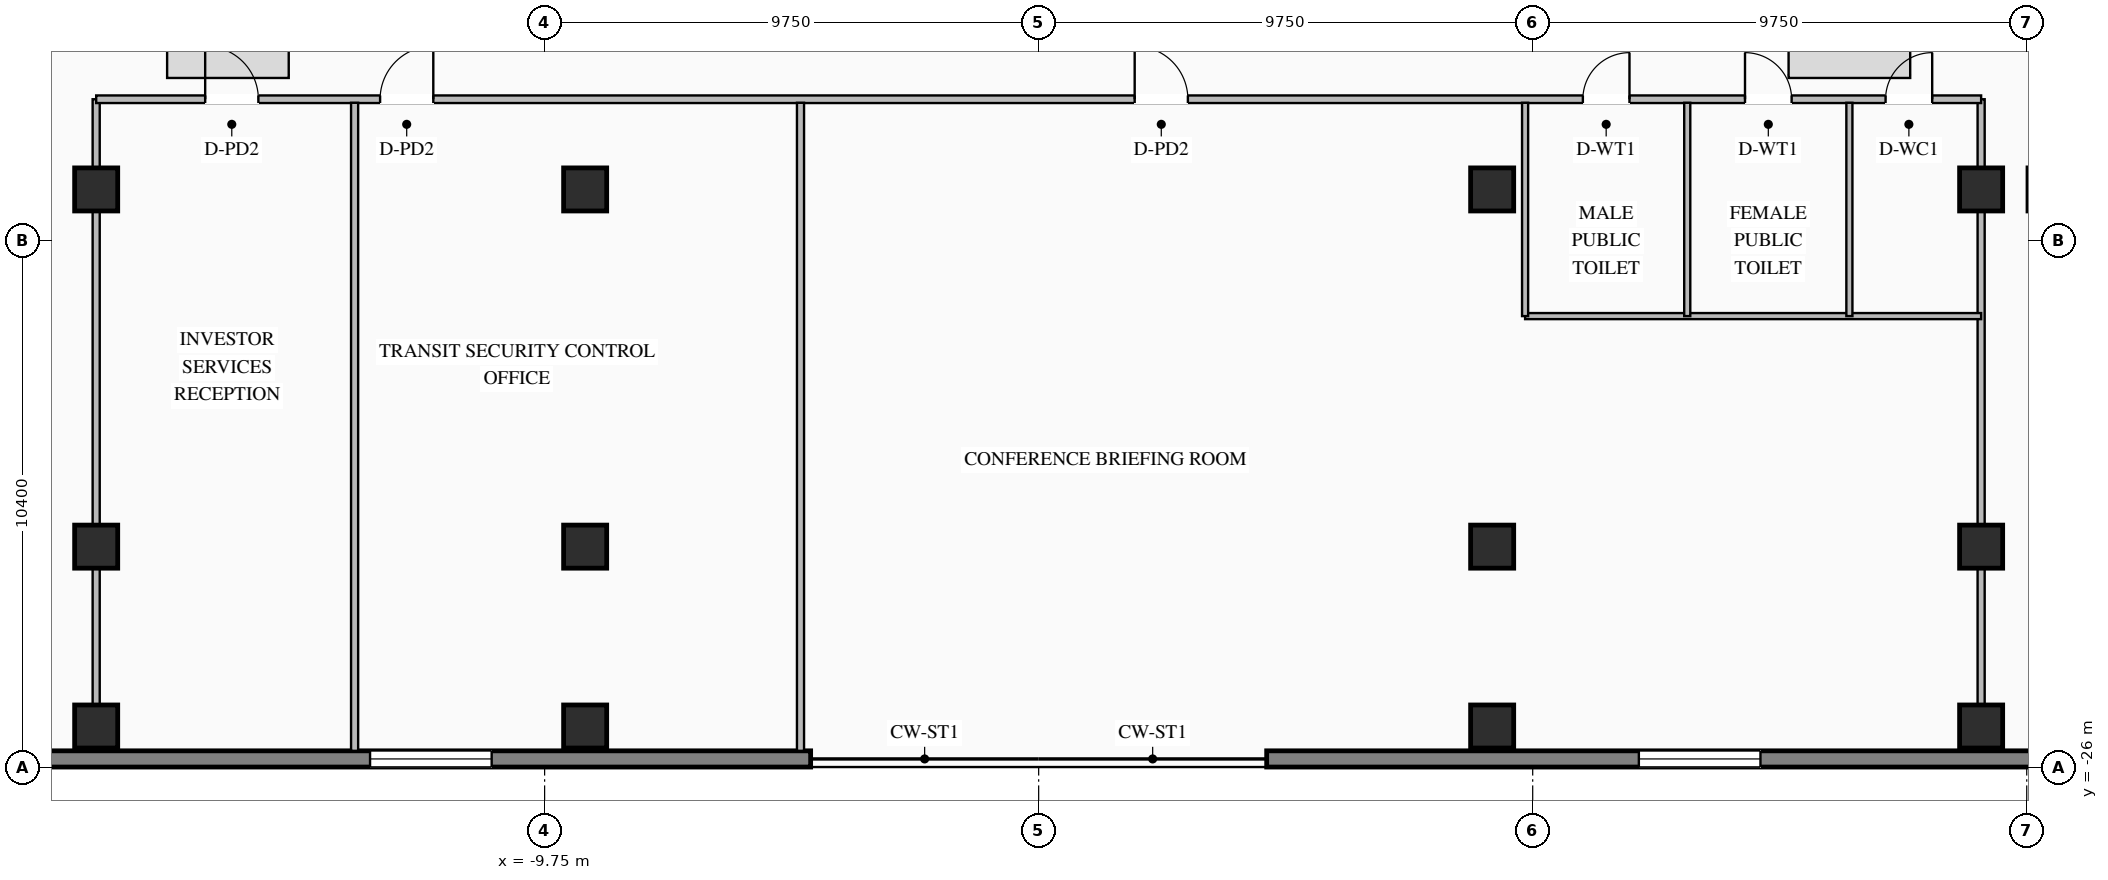
"""IFC4 building model, lengths in metres.
Left out: names, types, materials, properties, quantities, classifications, styles, units other than length and angle.
Written with IfcOpenShell. Run it as: python <this file> out.ifc"""

import sys

from ifc_helpers import new_model, si_unit, direction, frame, frame_2d, origin, origin_2d, place, context, subcontext, project, spatial, rectangle, i_section, extrude, element, fill, save


model = new_model("IFC4")
c1 = context("Model", 3, precision=1e-05, world=origin(), true_north=direction((0.0, 1.0)))
c2 = subcontext(c1, "Body", "Model", "MODEL_VIEW")
j1 = project(units=[si_unit("LENGTHUNIT", "METRE"), si_unit("PLANEANGLEUNIT", "RADIAN")], contexts=[c1])
p1 = place(None, origin())
s1 = spatial("IfcSite", under=j1, at=p1, CompositionType="ELEMENT")
p2 = place(p1, origin())
s2 = spatial("IfcBuilding", under=s1, at=p2, CompositionType="ELEMENT")
p3 = place(p2, frame((0.0, 0.0, 5.1)))
s3 = spatial("IfcBuildingStorey", under=s2, at=p3, CompositionType="ELEMENT", Elevation=5.1)
for number, where, z_axis, x_axis in (
    (1, (-18.6, -14.6, 0.0), (0.0, 0.0, 1.0), (1.0, 0.0, 0.0)),
    (2, (-8.95, -14.6, 0.0), (0.0, 0.0, 1.0), (1.0, 0.0, 0.0)),
    (3, (8.95, -14.6, 0.0), (0.0, 0.0, 1.0), (1.0, 0.0, 0.0)),
    (4, (18.6, -14.6, 0.0), (0.0, 0.0, 1.0), (1.0, 0.0, 0.0)),
    (5, (19.95, -14.6, 0.0), (0.0, 0.0, 1.0), (1.0, 0.0, 0.0)),
    (6, (-18.6, -21.65, 0.0), (0.0, 0.0, 1.0), (1.0, 0.0, 0.0)),
    (7, (-8.95, -21.65, 0.0), (0.0, 0.0, 1.0), (1.0, 0.0, 0.0)),
    (8, (8.95, -21.65, 0.0), (0.0, 0.0, 1.0), (1.0, 0.0, 0.0)),
    (9, (18.6, -21.65, 0.0), (0.0, 0.0, 1.0), (1.0, 0.0, 0.0)),
    (10, (-18.6, -25.2, 0.0), (0.0, 0.0, 1.0), (1.0, 0.0, 0.0)),
    (11, (-8.95, -25.2, 0.0), (0.0, 0.0, 1.0), (1.0, 0.0, 0.0)),
    (12, (8.95, -25.2, 0.0), (0.0, 0.0, 1.0), (1.0, 0.0, 0.0)),
    (13, (18.6, -25.2, 0.0), (0.0, 0.0, 1.0), (1.0, 0.0, 0.0)),
):
    element("IfcColumn", number, at=place(p3, frame(where, z_axis=z_axis, x_axis=x_axis)), inside=s3, PredefinedType="COLUMN", context=c2, shape_type="SweptSolid", body=[
        extrude(i_section(OverallWidth=0.85, OverallDepth=0.85, WebThickness=0.032, FlangeThickness=0.048, at=origin_2d()), origin(), (0.0, 0.0, 1.0), 4.5),
    ])
p4 = place(p3, frame((38.68, -25.84, 0.0), z_axis=(0.0, 0.0, 1.0), x_axis=(-1.0, 0.0, 0.0)))
e14 = element("IfcWall", 14, at=p4, inside=s3, PredefinedType="STANDARD", context=c2, shape_type="SweptSolid", body=[
    extrude(rectangle(XDim=34.18, YDim=0.32, at=frame_2d((17.09, 0.0))), origin(), (0.0, 0.0, 1.0), 4.23),
])
p5 = place(p4, frame((6.795, 0.0, 0.8)))
e15 = element("IfcOpeningElement", 15, at=p5, cuts=e14, PredefinedType="OPENING", context=c2, shape_type="SweptSolid", body=[
    extrude(rectangle(XDim=2.4, YDim=2.35, at=frame_2d((1.2, 1.175))), frame((0.0, 0.17, 0.0), z_axis=(0.0, -1.0, 0.0), x_axis=(1.0, 0.0, 0.0)), (0.0, 0.0, 1.0), 0.34),
])
p6 = place(p4, frame((16.44, 0.0, 0.8)))
e16 = element("IfcOpeningElement", 16, at=p6, cuts=e14, PredefinedType="OPENING", context=c2, shape_type="SweptSolid", body=[
    extrude(rectangle(XDim=2.4, YDim=2.35, at=frame_2d((1.2, 1.175))), frame((0.0, 0.17, 0.0), z_axis=(0.0, -1.0, 0.0), x_axis=(1.0, 0.0, 0.0)), (0.0, 0.0, 1.0), 0.34),
])
p7 = place(p4, frame((24.435, 0.0, 0.8)))
e17 = element("IfcOpeningElement", 17, at=p7, cuts=e14, PredefinedType="OPENING", context=c2, shape_type="SweptSolid", body=[
    extrude(rectangle(XDim=2.4, YDim=2.35, at=frame_2d((1.2, 1.175))), frame((0.0, 0.17, 0.0), z_axis=(0.0, -1.0, 0.0), x_axis=(1.0, 0.0, 0.0)), (0.0, 0.0, 1.0), 0.34),
])
p8 = place(p3, frame((-4.5, -25.84, 0.0), z_axis=(0.0, 0.0, 1.0), x_axis=(-1.0, 0.0, 0.0)))
e18 = element("IfcWall", 18, at=p8, inside=s3, PredefinedType="STANDARD", context=c2, shape_type="SweptSolid", body=[
    extrude(rectangle(XDim=34.18, YDim=0.32, at=frame_2d((17.09, 0.0))), origin(), (0.0, 0.0, 1.0), 4.23),
])
p9 = place(p8, frame((6.295, 0.0, 0.8)))
e19 = element("IfcOpeningElement", 19, at=p9, cuts=e18, PredefinedType="OPENING", context=c2, shape_type="SweptSolid", body=[
    extrude(rectangle(XDim=2.4, YDim=2.35, at=frame_2d((1.2, 1.175))), frame((0.0, 0.17, 0.0), z_axis=(0.0, -1.0, 0.0), x_axis=(1.0, 0.0, 0.0)), (0.0, 0.0, 1.0), 0.34),
])
p10 = place(p8, frame((15.34, 0.0, 0.8)))
e20 = element("IfcOpeningElement", 20, at=p10, cuts=e18, PredefinedType="OPENING", context=c2, shape_type="SweptSolid", body=[
    extrude(rectangle(XDim=2.4, YDim=2.35, at=frame_2d((1.2, 1.175))), frame((0.0, 0.17, 0.0), z_axis=(0.0, -1.0, 0.0), x_axis=(1.0, 0.0, 0.0)), (0.0, 0.0, 1.0), 0.34),
])
p11 = place(p8, frame((24.985, 0.0, 0.8)))
e21 = element("IfcOpeningElement", 21, at=p11, cuts=e18, PredefinedType="OPENING", context=c2, shape_type="SweptSolid", body=[
    extrude(rectangle(XDim=2.4, YDim=2.35, at=frame_2d((1.2, 1.175))), frame((0.0, 0.17, 0.0), z_axis=(0.0, -1.0, 0.0), x_axis=(1.0, 0.0, 0.0)), (0.0, 0.0, 1.0), 0.34),
])
for number, where, z_axis, x_axis in (
    (22, (-18.6, -25.68, 0.0), (0.0, 0.0, 1.0), (0.0, 1.0, 0.0)),
    (23, (18.6, -25.68, 0.0), (0.0, 0.0, 1.0), (0.0, 1.0, 0.0)),
):
    element("IfcWall", number, at=place(p3, frame(where, z_axis=z_axis, x_axis=x_axis)), inside=s3, PredefinedType="STANDARD", context=c2, shape_type="SweptSolid", body=[
        extrude(rectangle(XDim=12.86, YDim=0.14, at=frame_2d((6.43, 0.0))), origin(), (0.0, 0.0, 1.0), 3.525),
    ])
p12 = place(p3, frame((-18.6, -12.82, 0.0), z_axis=(0.0, 0.0, 1.0), x_axis=(1.0, 0.0, 0.0)))
e24 = element("IfcWall", 24, at=p12, inside=s3, PredefinedType="STANDARD", context=c2, shape_type="SweptSolid", body=[
    extrude(rectangle(XDim=37.2, YDim=0.15, at=frame_2d((18.6, 0.0))), origin(), (0.0, 0.0, 1.0), 4.23),
])
p13 = place(p12, frame((29.34, 0.0, 0.0)))
e25 = element("IfcOpeningElement", 25, at=p13, cuts=e24, PredefinedType="OPENING", context=c2, shape_type="SweptSolid", body=[
    extrude(rectangle(XDim=0.92, YDim=2.08, at=frame_2d((0.46, 1.04))), frame((0.0, 0.085, 0.0), z_axis=(0.0, -1.0, 0.0), x_axis=(1.0, 0.0, 0.0)), (0.0, 0.0, 1.0), 0.17),
])
p14 = place(p12, frame((32.54, 0.0, 0.0)))
e26 = element("IfcOpeningElement", 26, at=p14, cuts=e24, PredefinedType="OPENING", context=c2, shape_type="SweptSolid", body=[
    extrude(rectangle(XDim=0.92, YDim=2.08, at=frame_2d((0.46, 1.04))), frame((0.0, 0.085, 0.0), z_axis=(0.0, -1.0, 0.0), x_axis=(1.0, 0.0, 0.0)), (0.0, 0.0, 1.0), 0.17),
])
p15 = place(p12, frame((35.314, 0.0, 0.0)))
e27 = element("IfcOpeningElement", 27, at=p15, cuts=e24, PredefinedType="OPENING", context=c2, shape_type="SweptSolid", body=[
    extrude(rectangle(XDim=0.92, YDim=2.08, at=frame_2d((0.46, 1.04))), frame((0.0, 0.085, 0.0), z_axis=(0.0, -1.0, 0.0), x_axis=(1.0, 0.0, 0.0)), (0.0, 0.0, 1.0), 0.17),
])
p16 = place(p12, frame((2.151, 0.0, 0.0)))
e28 = element("IfcOpeningElement", 28, at=p16, cuts=e24, PredefinedType="OPENING", context=c2, shape_type="SweptSolid", body=[
    extrude(rectangle(XDim=1.05, YDim=2.08, at=frame_2d((0.525, 1.04))), frame((0.0, 0.085, 0.0), z_axis=(0.0, -1.0, 0.0), x_axis=(1.0, 0.0, 0.0)), (0.0, 0.0, 1.0), 0.17),
])
p17 = place(p12, frame((5.603, 0.0, 0.0)))
e29 = element("IfcOpeningElement", 29, at=p17, cuts=e24, PredefinedType="OPENING", context=c2, shape_type="SweptSolid", body=[
    extrude(rectangle(XDim=1.05, YDim=2.08, at=frame_2d((0.525, 1.04))), frame((0.0, 0.085, 0.0), z_axis=(0.0, -1.0, 0.0), x_axis=(1.0, 0.0, 0.0)), (0.0, 0.0, 1.0), 0.17),
])
p18 = place(p12, frame((20.495, 0.0, 0.0)))
e30 = element("IfcOpeningElement", 30, at=p18, cuts=e24, PredefinedType="OPENING", context=c2, shape_type="SweptSolid", body=[
    extrude(rectangle(XDim=1.05, YDim=2.08, at=frame_2d((0.525, 1.04))), frame((0.0, 0.085, 0.0), z_axis=(0.0, -1.0, 0.0), x_axis=(1.0, 0.0, 0.0)), (0.0, 0.0, 1.0), 0.17),
])
p19 = place(p3, frame((9.6, -17.1, 0.0), z_axis=(0.0, 0.0, 1.0), x_axis=(1.0, 0.0, 0.0)))
e31 = element("IfcWall", 31, at=p19, inside=s3, PredefinedType="STANDARD", context=c2, shape_type="SweptSolid", body=[
    extrude(rectangle(XDim=9.0, YDim=0.12, at=frame_2d((4.5, 0.0))), origin(), (0.0, 0.0, 1.0), 4.23),
])
for number, where, z_axis, x_axis in (
    (32, (9.6, -17.1, 0.0), (0.0, 0.0, 1.0), (0.0, 1.0, 0.0)),
    (33, (12.8, -17.1, 0.0), (0.0, 0.0, 1.0), (0.0, 1.0, 0.0)),
    (34, (16.0, -17.1, 0.0), (0.0, 0.0, 1.0), (0.0, 1.0, 0.0)),
):
    element("IfcWall", number, at=place(p3, frame(where, z_axis=z_axis, x_axis=x_axis)), inside=s3, PredefinedType="STANDARD", context=c2, shape_type="SweptSolid", body=[
        extrude(rectangle(XDim=4.21, YDim=0.12, at=frame_2d((2.105, 0.0))), origin(), (0.0, 0.0, 1.0), 4.23),
    ])
for number, where, z_axis, x_axis in (
    (35, (-13.5, -25.68, 0.0), (0.0, 0.0, 1.0), (0.0, 1.0, 0.0)),
    (36, (-4.7, -25.68, 0.0), (0.0, 0.0, 1.0), (0.0, 1.0, 0.0)),
):
    element("IfcWall", number, at=place(p3, frame(where, z_axis=z_axis, x_axis=x_axis)), inside=s3, PredefinedType="STANDARD", context=c2, shape_type="SweptSolid", body=[
        extrude(rectangle(XDim=12.79, YDim=0.14, at=frame_2d((6.395, 0.0))), origin(), (0.0, 0.0, 1.0), 4.23),
    ])
p20 = place(p7, origin())
e37 = element("IfcWindow", 37, at=p20, inside=s3, PartitioningType="DOUBLE_PANEL_VERTICAL", PredefinedType="WINDOW", context=c2, shape_type="SweptSolid", body=[
    extrude(rectangle(XDim=2.4, YDim=2.35, at=frame_2d((1.2, 1.175))), frame((0.0, 0.03, 0.0), z_axis=(0.0, -1.0, 0.0), x_axis=(1.0, 0.0, 0.0)), (0.0, 0.0, 1.0), 0.06),
])
fill(e17, e37)
p21 = place(p9, origin())
e38 = element("IfcWindow", 38, at=p21, inside=s3, PartitioningType="DOUBLE_PANEL_VERTICAL", PredefinedType="WINDOW", context=c2, shape_type="SweptSolid", body=[
    extrude(rectangle(XDim=2.4, YDim=2.35, at=frame_2d((1.2, 1.175))), frame((0.0, 0.03, 0.0), z_axis=(0.0, -1.0, 0.0), x_axis=(1.0, 0.0, 0.0)), (0.0, 0.0, 1.0), 0.06),
])
fill(e19, e38)
p22 = place(p13, origin())
e39 = element("IfcDoor", 39, at=p22, inside=s3, OperationType="SINGLE_SWING_RIGHT", PredefinedType="DOOR", context=c2, shape_type="SweptSolid", body=[
    extrude(rectangle(XDim=0.92, YDim=2.08, at=frame_2d((0.46, 1.04))), frame((0.0, 0.025, 0.0), z_axis=(0.0, -1.0, 0.0), x_axis=(1.0, 0.0, 0.0)), (0.0, 0.0, 1.0), 0.05),
])
fill(e25, e39)
p23 = place(p14, origin())
e40 = element("IfcDoor", 40, at=p23, inside=s3, OperationType="SINGLE_SWING_LEFT", PredefinedType="DOOR", context=c2, shape_type="SweptSolid", body=[
    extrude(rectangle(XDim=0.92, YDim=2.08, at=frame_2d((0.46, 1.04))), frame((0.0, 0.025, 0.0), z_axis=(0.0, -1.0, 0.0), x_axis=(1.0, 0.0, 0.0)), (0.0, 0.0, 1.0), 0.05),
])
fill(e26, e40)
p24 = place(p15, origin())
e41 = element("IfcDoor", 41, at=p24, inside=s3, OperationType="SINGLE_SWING_RIGHT", PredefinedType="DOOR", context=c2, shape_type="SweptSolid", body=[
    extrude(rectangle(XDim=0.92, YDim=2.08, at=frame_2d((0.46, 1.04))), frame((0.0, 0.025, 0.0), z_axis=(0.0, -1.0, 0.0), x_axis=(1.0, 0.0, 0.0)), (0.0, 0.0, 1.0), 0.05),
])
fill(e27, e41)
p25 = place(p16, origin())
e42 = element("IfcDoor", 42, at=p25, inside=s3, OperationType="SINGLE_SWING_LEFT", PredefinedType="DOOR", context=c2, shape_type="SweptSolid", body=[
    extrude(rectangle(XDim=1.05, YDim=2.08, at=frame_2d((0.525, 1.04))), frame((0.0, 0.025, 0.0), z_axis=(0.0, -1.0, 0.0), x_axis=(1.0, 0.0, 0.0)), (0.0, 0.0, 1.0), 0.05),
])
fill(e28, e42)
p26 = place(p17, origin())
e43 = element("IfcDoor", 43, at=p26, inside=s3, OperationType="SINGLE_SWING_RIGHT", PredefinedType="DOOR", context=c2, shape_type="SweptSolid", body=[
    extrude(rectangle(XDim=1.05, YDim=2.08, at=frame_2d((0.525, 1.04))), frame((0.0, 0.025, 0.0), z_axis=(0.0, -1.0, 0.0), x_axis=(1.0, 0.0, 0.0)), (0.0, 0.0, 1.0), 0.05),
])
fill(e29, e43)
p27 = place(p18, origin())
e44 = element("IfcDoor", 44, at=p27, inside=s3, OperationType="SINGLE_SWING_LEFT", PredefinedType="DOOR", context=c2, shape_type="SweptSolid", body=[
    extrude(rectangle(XDim=1.05, YDim=2.08, at=frame_2d((0.525, 1.04))), frame((0.0, 0.025, 0.0), z_axis=(0.0, -1.0, 0.0), x_axis=(1.0, 0.0, 0.0)), (0.0, 0.0, 1.0), 0.05),
])
fill(e30, e44)
save(model, sys.argv[1])
